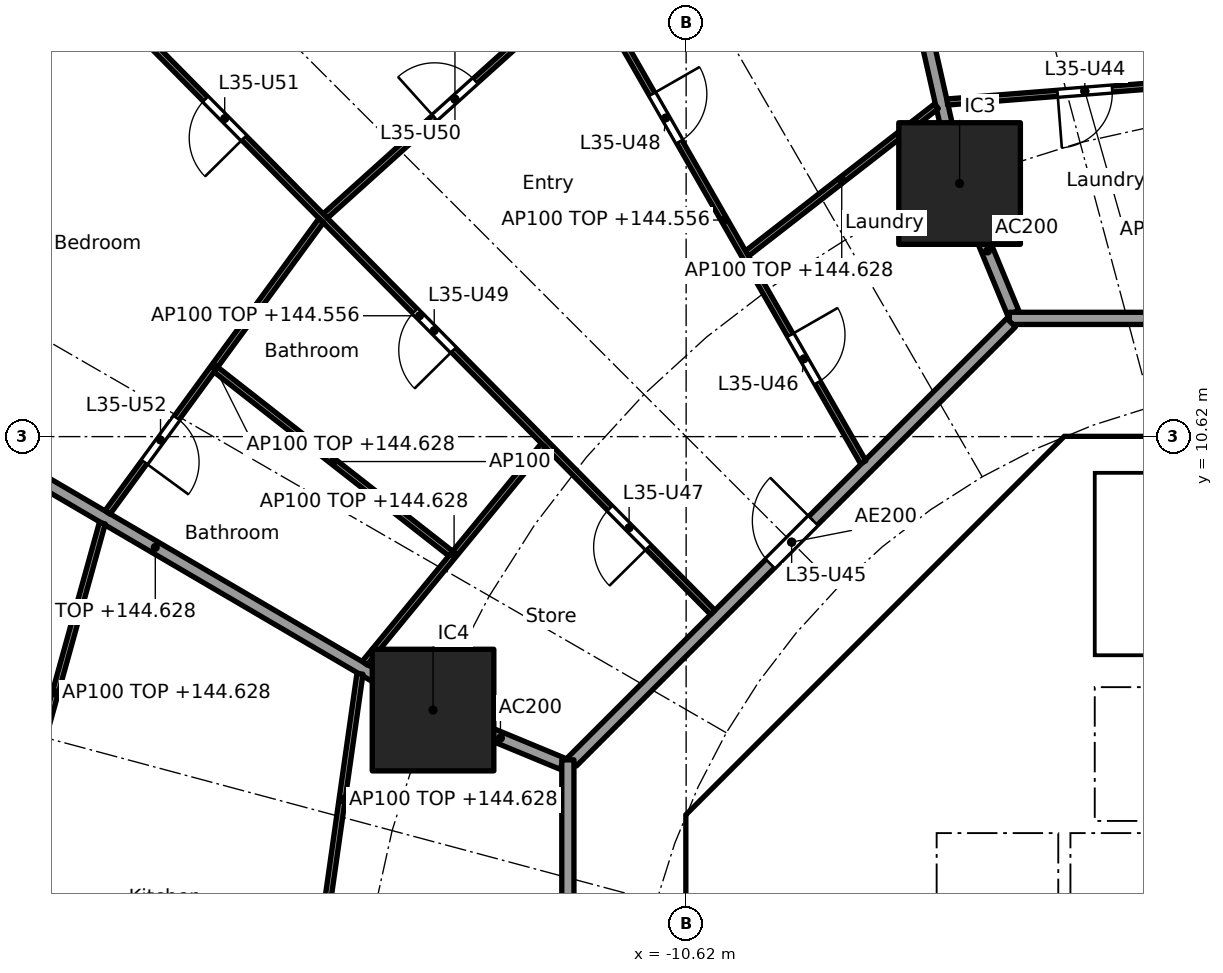
"""IFC4 building model, lengths in metres.
Left out: names, types, materials, properties, quantities, classifications, styles, units other than length and angle.
Written with IfcOpenShell. Run it as: python <this file> out.ifc"""

import sys

from ifc_helpers import new_model, si_unit, direction, frame, frame_2d, origin, origin_2d, place, context, subcontext, project, spatial, polyline, rectangle, outline, extrude, element, fill, save


model = new_model("IFC4")
c1 = context("Model", 3, precision=1e-05, world=origin(), true_north=direction((0.0, 1.0)))
c2 = subcontext(c1, "Body", "Model", "MODEL_VIEW")
j1 = project(units=[si_unit("LENGTHUNIT", "METRE"), si_unit("PLANEANGLEUNIT", "RADIAN")], contexts=[c1])
p1 = place(None, origin())
s1 = spatial("IfcSite", under=j1, at=p1, CompositionType="ELEMENT")
p2 = place(p1, origin())
s2 = spatial("IfcBuilding", under=s1, at=p2, CompositionType="ELEMENT")
p3 = place(p2, frame((0.0, 0.0, 141.8)))
s3 = spatial("IfcBuildingStorey", under=s2, at=p3, CompositionType="ELEMENT", Elevation=141.8)
for number, where, z_axis, x_axis in (
    (1, (-6.123, 14.782, 0.0), (0.0, 0.0, 1.0), (1.0, 0.0, 0.0)),
    (2, (-14.782, 6.123, 0.0), (0.0, 0.0, 1.0), (1.0, 0.0, 0.0)),
):
    element("IfcColumn", number, at=place(p3, frame(where, z_axis=z_axis, x_axis=x_axis)), inside=s3, PredefinedType="COLUMN", context=c2, shape_type="SweptSolid", body=[
        extrude(rectangle(XDim=2.0, YDim=2.0, at=origin_2d()), origin(), (0.0, 0.0, 1.0), 3.7),
    ])
p4 = place(p3, frame((-4.613, 9.988, 0.0), z_axis=(0.0, 0.0, 1.0), x_axis=(-0.707106781187, -0.707106781187, 0.0)))
e3 = element("IfcWall", 3, at=p4, inside=s3, PredefinedType="SHEAR", context=c2, shape_type="SweptSolid", body=[
    extrude(rectangle(XDim=7.602, YDim=0.6, at=frame_2d((3.801, 0.0))), origin(), (0.0, 0.0, 1.0), 3.44),
])
p5 = place(p4, frame((0.351, 0.0, 0.0)))
e4 = element("IfcOpeningElement", 4, at=p5, cuts=e3, PredefinedType="OPENING", context=c2, shape_type="SweptSolid", body=[
    extrude(rectangle(XDim=1.1, YDim=2.1, at=frame_2d((0.55, 1.05))), frame((0.0, 0.31, 0.0), z_axis=(0.0, -1.0, 0.0), x_axis=(1.0, 0.0, 0.0)), (0.0, 0.0, 1.0), 0.62),
])
p6 = place(p3, frame((-10.325, 3.801, 0.0), z_axis=(0.0, 0.0, 1.0), x_axis=(0.0, -1.0, 0.0)))
e5 = element("IfcWall", 5, at=p6, inside=s3, PredefinedType="SHEAR", context=c2, shape_type="SweptSolid", body=[
    extrude(rectangle(XDim=7.602, YDim=0.6, at=frame_2d((3.801, 0.0))), origin(), (0.0, 0.0, 1.0), 3.44),
])
p7 = place(p6, frame((0.651, 0.0, 0.0)))
e6 = element("IfcOpeningElement", 6, at=p7, cuts=e5, PredefinedType="OPENING", context=c2, shape_type="SweptSolid", body=[
    extrude(rectangle(XDim=1.5, YDim=2.1, at=frame_2d((0.75, 1.05))), frame((0.0, 0.31, 0.0), z_axis=(0.0, -1.0, 0.0), x_axis=(1.0, 0.0, 0.0)), (0.0, 0.0, 1.0), 0.62),
])
p8 = place(p6, frame((5.451, 0.0, 0.0)))
e7 = element("IfcOpeningElement", 7, at=p8, cuts=e5, PredefinedType="OPENING", context=c2, shape_type="SweptSolid", body=[
    extrude(rectangle(XDim=1.5, YDim=2.1, at=frame_2d((0.75, 1.05))), frame((0.0, 0.31, 0.0), z_axis=(0.0, -1.0, 0.0), x_axis=(1.0, 0.0, 0.0)), (0.0, 0.0, 1.0), 0.62),
])
p9 = place(p3, frame((-5.8, 4.3, 0.0), z_axis=(0.0, 0.0, 1.0), x_axis=(0.0, 1.0, 0.0)))
e8 = element("IfcWall", 8, at=p9, inside=s3, PredefinedType="PARTITIONING", context=c2, shape_type="SweptSolid", body=[
    extrude(rectangle(XDim=3.927, YDim=0.15, at=frame_2d((1.963, 0.0))), origin(), (0.0, 0.0, 1.0), 3.44),
])
p10 = place(p9, frame((0.413, 0.0, 0.0)))
e9 = element("IfcOpeningElement", 9, at=p10, cuts=e8, PredefinedType="OPENING", context=c2, shape_type="SweptSolid", body=[
    extrude(rectangle(XDim=0.9, YDim=2.1, at=frame_2d((0.45, 1.05))), frame((0.0, 0.085, 0.0), z_axis=(0.0, -1.0, 0.0), x_axis=(1.0, 0.0, 0.0)), (0.0, 0.0, 1.0), 0.17),
])
p11 = place(p9, frame((2.489, 0.0, 0.0)))
e10 = element("IfcOpeningElement", 10, at=p11, cuts=e8, PredefinedType="OPENING", context=c2, shape_type="SweptSolid", body=[
    extrude(rectangle(XDim=0.9, YDim=2.1, at=frame_2d((0.45, 1.05))), frame((0.0, 0.085, 0.0), z_axis=(0.0, -1.0, 0.0), x_axis=(1.0, 0.0, 0.0)), (0.0, 0.0, 1.0), 0.17),
])
p12 = place(p3, frame((-4.0, 4.3, 0.0), z_axis=(0.0, 0.0, 1.0), x_axis=(0.0, 1.0, 0.0)))
e11 = element("IfcWall", 11, at=p12, inside=s3, PredefinedType="SOLIDWALL", context=c2, shape_type="SweptSolid", body=[
    extrude(rectangle(XDim=2.2, YDim=0.2, at=frame_2d((1.1, 0.0))), origin(), (0.0, 0.0, 1.0), 3.44),
])
p13 = place(p12, frame((0.55, 0.0, 0.0)))
e12 = element("IfcOpeningElement", 12, at=p13, cuts=e11, PredefinedType="OPENING", context=c2, shape_type="SweptSolid", body=[
    extrude(rectangle(XDim=1.1, YDim=2.1, at=frame_2d((0.55, 1.05))), frame((0.0, 0.11, 0.0), z_axis=(0.0, -1.0, 0.0), x_axis=(1.0, 0.0, 0.0)), (0.0, 0.0, 1.0), 0.22),
])
p14 = place(p3, origin())
e13 = element("IfcWall", 13, at=p14, inside=s3, PredefinedType="SHEAR", context=c2, shape_type="SweptSolid", body=[
    extrude(outline(polyline([(-10.2, 4.825), (-9.776, 4.401), (-10.025, 4.152), (-10.025, 3.801), (-10.625, 3.801), (-10.625, 4.401), (-10.2, 4.825)])), origin(), (0.0, 0.0, 1.0), 3.44),
])
p15 = place(p3, origin())
e14 = element("IfcWall", 14, at=p15, inside=s3, PredefinedType="SHEAR", context=c2, shape_type="SweptSolid", body=[
    extrude(outline(polyline([(-4.152, 10.025), (-4.401, 9.776), (-4.825, 10.2), (-4.401, 10.625), (4.401, 10.625), (4.825, 10.2), (4.401, 9.776), (4.152, 10.025), (-4.152, 10.025)])), origin(), (0.0, 0.0, 1.0), 3.44),
])
p16 = place(p3, frame((-10.025, 4.0, 0.0), z_axis=(0.0, 0.0, 1.0), x_axis=(1.0, 0.0, 0.0)))
e15 = element("IfcWall", 15, at=p16, inside=s3, PredefinedType="PARTITIONING", context=c2, shape_type="SweptSolid", body=[
    extrude(rectangle(XDim=3.325, YDim=0.2, at=frame_2d((1.662, 0.0))), origin(), (0.0, 0.0, 1.0), 3.44),
])
p17 = place(p3, frame((-8.001, 6.1, 0.0), z_axis=(0.0, 0.0, 1.0), x_axis=(1.0, 0.0, 0.0)))
e16 = element("IfcWall", 16, at=p17, inside=s3, PredefinedType="PARTITIONING", context=c2, shape_type="SweptSolid", body=[
    extrude(rectangle(XDim=2.126, YDim=0.15, at=frame_2d((1.063, 0.0))), origin(), (0.0, 0.0, 1.0), 3.44),
])
p18 = place(p3, origin())
e17 = element("IfcWall", 17, at=p18, inside=s3, PredefinedType="SOLIDWALL", context=c2, shape_type="SweptSolid", body=[
    extrude(outline(polyline([(-6.5, 2.1), (-6.7, 2.1), (-6.7, 4.3), (6.7, 4.3), (6.7, 2.1), (6.5, 2.1), (6.5, 4.1), (4.5, 4.1), (4.5, 2.1), (4.3, 2.1), (4.3, 4.1), (2.3, 4.1), (2.3, 2.1), (2.1, 2.1), (2.1, 4.1), (0.1, 4.1), (0.1, 2.1), (-0.1, 2.1), (-0.1, 4.1), (-2.1, 4.1), (-2.1, 2.1), (-2.3, 2.1), (-2.3, 4.1), (-4.3, 4.1), (-4.3, 2.1), (-4.5, 2.1), (-4.5, 4.1), (-6.5, 4.1), (-6.5, 2.1)])), origin(), (0.0, 0.0, 1.0), 3.44),
])
p19 = place(p3, origin())
e18 = element("IfcWall", 18, at=p19, inside=s3, PredefinedType="SOLIDWALL", context=c2, shape_type="SweptSolid", body=[
    extrude(outline(polyline([(-3.9, 7.025), (-4.1, 7.025), (-4.1, 10.025), (-3.9, 10.025), (-3.9, 7.025)])), origin(), (0.0, 0.0, 1.0), 3.44),
])
p20 = place(p3, origin())
e19 = element("IfcWall", 19, at=p20, inside=s3, PredefinedType="SOLIDWALL", context=c2, shape_type="SweptSolid", body=[
    extrude(outline(polyline([(4.1, 6.5), (-4.1, 6.5), (-4.1, 7.025), (4.1, 7.025), (4.1, 6.5)])), origin(), (0.0, 0.0, 1.0), 3.44),
])
p21 = place(p3, frame((-5.243, 12.657, 0.0), z_axis=(0.0, 0.0, 1.0), x_axis=(-0.38273085373, 0.923859888513, 0.0)))
e20 = element("IfcWall", 20, at=p21, inside=s3, PredefinedType="PARTITIONING", context=c2, shape_type="SweptSolid", body=[
    extrude(rectangle(XDim=2.199, YDim=0.2, at=frame_2d((1.1, 0.0))), origin(), (0.0, 0.0, 1.0), 3.44),
])
p22 = place(p3, frame((-6.134, 14.831, 0.0), z_axis=(0.0, 0.0, 1.0), x_axis=(-0.220337590808, 0.975423675167, 0.0)))
e21 = element("IfcWall", 21, at=p22, inside=s3, PredefinedType="PARTITIONING", context=c2, shape_type="SweptSolid", body=[
    extrude(rectangle(XDim=10.451, YDim=0.2, at=frame_2d((5.226, 0.0))), origin(), (0.0, 0.0, 1.0), 2.828),
])
p23 = place(p3, frame((-12.657, 5.243, 0.0), z_axis=(0.0, 0.0, 1.0), x_axis=(-0.923869415315, 0.382707856524, 0.0)))
e22 = element("IfcWall", 22, at=p23, inside=s3, PredefinedType="PARTITIONING", context=c2, shape_type="SweptSolid", body=[
    extrude(rectangle(XDim=2.2, YDim=0.2, at=frame_2d((1.1, 0.0))), origin(), (0.0, 0.0, 1.0), 3.44),
])
p24 = place(p3, frame((-14.825, 6.148, 0.0), z_axis=(0.0, 0.0, 1.0), x_axis=(-0.862852031662, 0.505456597006, 0.0)))
e23 = element("IfcWall", 23, at=p24, inside=s3, PredefinedType="PARTITIONING", context=c2, shape_type="SweptSolid", body=[
    extrude(rectangle(XDim=10.487, YDim=0.2, at=frame_2d((5.244, 0.0))), origin(), (0.0, 0.0, 1.0), 2.828),
])
p25 = place(p3, frame((5.104, 12.565, 0.0), z_axis=(0.0, 0.0, 1.0), x_axis=(-1.0, 0.0, 0.0)))
e24 = element("IfcWall", 24, at=p25, inside=s3, PredefinedType="PARTITIONING", context=c2, shape_type="SweptSolid", body=[
    extrude(rectangle(XDim=10.409, YDim=0.2, at=frame_2d((5.205, 0.0))), origin(), (0.0, 0.0, 1.0), 3.44),
])
p26 = place(p3, frame((-5.275, 12.494, 0.0), z_axis=(0.0, 0.0, 1.0), x_axis=(-0.707106781187, -0.707106781187, 0.0)))
e25 = element("IfcWall", 25, at=p26, inside=s3, PredefinedType="PARTITIONING", context=c2, shape_type="SweptSolid", body=[
    extrude(rectangle(XDim=10.209, YDim=0.2, at=frame_2d((5.104, 0.0))), origin(), (0.0, 0.0, 1.0), 3.44),
])
p27 = place(p26, frame((4.604, 0.0, 0.0)))
e26 = element("IfcOpeningElement", 26, at=p27, cuts=e25, PredefinedType="OPENING", context=c2, shape_type="SweptSolid", body=[
    extrude(rectangle(XDim=1.0, YDim=2.1, at=frame_2d((0.5, 1.05))), frame((0.0, 0.11, 0.0), z_axis=(0.0, -1.0, 0.0), x_axis=(1.0, 0.0, 0.0)), (0.0, 0.0, 1.0), 0.22),
])
p28 = place(p3, frame((-12.565, 5.304, 0.0), z_axis=(0.0, 0.0, 1.0), x_axis=(0.0, -1.0, 0.0)))
e27 = element("IfcWall", 27, at=p28, inside=s3, PredefinedType="PARTITIONING", context=c2, shape_type="SweptSolid", body=[
    extrude(rectangle(XDim=10.409, YDim=0.2, at=frame_2d((5.205, 0.0))), origin(), (0.0, 0.0, 1.0), 3.44),
])
p29 = place(p3, frame((-1.802, 16.479, 0.0), z_axis=(0.0, 0.0, 1.0), x_axis=(-0.996907698294, -0.078581429625, 0.0)))
e28 = element("IfcWall", 28, at=p29, inside=s3, PredefinedType="PARTITIONING", context=c2, shape_type="SweptSolid", body=[
    extrude(rectangle(XDim=4.536, YDim=0.1, at=frame_2d((2.268, 0.0))), origin(), (0.0, 0.0, 1.0), 2.828),
])
p30 = place(p29, frame((1.818, 0.0, 0.0)))
e29 = element("IfcOpeningElement", 29, at=p30, cuts=e28, PredefinedType="OPENING", context=c2, shape_type="SweptSolid", body=[
    extrude(rectangle(XDim=0.9, YDim=2.1, at=frame_2d((0.45, 1.05))), frame((0.0, 0.06, 0.0), z_axis=(0.0, -1.0, 0.0), x_axis=(1.0, 0.0, 0.0)), (0.0, 0.0, 1.0), 0.12),
])
p31 = place(p3, frame((-6.503, 16.054, 0.0), z_axis=(0.0, 0.0, 1.0), x_axis=(-0.789428807693, -0.613842127574, 0.0)))
e30 = element("IfcWall", 30, at=p31, inside=s3, PredefinedType="PARTITIONING", context=c2, shape_type="SweptSolid", body=[
    extrude(rectangle(XDim=3.948, YDim=0.1, at=frame_2d((1.974, 0.0))), origin(), (0.0, 0.0, 1.0), 2.828),
])
p32 = place(p3, frame((-7.708, 10.198, 0.0), z_axis=(0.0, 0.0, 1.0), x_axis=(-0.497449462689, 0.867492957937, 0.0)))
e31 = element("IfcWall", 31, at=p32, inside=s3, PredefinedType="PARTITIONING", context=c2, shape_type="SweptSolid", body=[
    extrude(rectangle(XDim=9.185, YDim=0.1, at=frame_2d((4.592, 0.0))), origin(), (0.0, 0.0, 1.0), 2.756),
])
p33 = place(p32, frame((1.511, 0.0, 0.0)))
e32 = element("IfcOpeningElement", 32, at=p33, cuts=e31, PredefinedType="OPENING", context=c2, shape_type="SweptSolid", body=[
    extrude(rectangle(XDim=0.9, YDim=2.1, at=frame_2d((0.45, 1.05))), frame((0.0, 0.06, 0.0), z_axis=(0.0, -1.0, 0.0), x_axis=(1.0, 0.0, 0.0)), (0.0, 0.0, 1.0), 0.12),
])
p34 = place(p32, frame((6.078, 0.0, 0.0)))
e33 = element("IfcOpeningElement", 33, at=p34, cuts=e31, PredefinedType="OPENING", context=c2, shape_type="SweptSolid", body=[
    extrude(rectangle(XDim=0.9, YDim=2.1, at=frame_2d((0.45, 1.05))), frame((0.0, 0.06, 0.0), z_axis=(0.0, -1.0, 0.0), x_axis=(1.0, 0.0, 0.0)), (0.0, 0.0, 1.0), 0.12),
])
p35 = place(p3, frame((-12.289, 18.089, 0.0), z_axis=(0.0, 0.0, 1.0), x_axis=(-0.743146066164, -0.669129228435, 0.0)))
e34 = element("IfcWall", 34, at=p35, inside=s3, PredefinedType="PARTITIONING", context=c2, shape_type="SweptSolid", body=[
    extrude(rectangle(XDim=5.739, YDim=0.1, at=frame_2d((2.87, 0.0))), origin(), (0.0, 0.0, 1.0), 2.828),
])
p36 = place(p35, frame((2.42, 0.0, 0.0)))
e35 = element("IfcOpeningElement", 35, at=p36, cuts=e34, PredefinedType="OPENING", context=c2, shape_type="SweptSolid", body=[
    extrude(rectangle(XDim=0.9, YDim=2.1, at=frame_2d((0.45, 1.05))), frame((0.0, 0.06, 0.0), z_axis=(0.0, -1.0, 0.0), x_axis=(1.0, 0.0, 0.0)), (0.0, 0.0, 1.0), 0.12),
])
p37 = place(p3, frame((-10.182, 7.729, 0.0), z_axis=(0.0, 0.0, 1.0), x_axis=(-0.702930219229, 0.7112588185, 0.0)))
e36 = element("IfcWall", 36, at=p37, inside=s3, PredefinedType="PARTITIONING", context=c2, shape_type="SweptSolid", body=[
    extrude(rectangle(XDim=13.719, YDim=0.1, at=frame_2d((6.859, 0.0))), origin(), (0.0, 0.0, 1.0), 2.756),
])
p38 = place(p37, frame((1.507, 0.0, 0.0)))
e37 = element("IfcOpeningElement", 37, at=p38, cuts=e36, PredefinedType="OPENING", context=c2, shape_type="SweptSolid", body=[
    extrude(rectangle(XDim=0.9, YDim=2.1, at=frame_2d((0.45, 1.05))), frame((0.0, 0.06, 0.0), z_axis=(0.0, -1.0, 0.0), x_axis=(1.0, 0.0, 0.0)), (0.0, 0.0, 1.0), 0.12),
])
p39 = place(p37, frame((6.067, 0.0, 0.0)))
e38 = element("IfcOpeningElement", 38, at=p39, cuts=e36, PredefinedType="OPENING", context=c2, shape_type="SweptSolid", body=[
    extrude(rectangle(XDim=0.9, YDim=2.1, at=frame_2d((0.45, 1.05))), frame((0.0, 0.06, 0.0), z_axis=(0.0, -1.0, 0.0), x_axis=(1.0, 0.0, 0.0)), (0.0, 0.0, 1.0), 0.12),
])
p40 = place(p37, frame((10.969, 0.0, 0.0)))
e39 = element("IfcOpeningElement", 39, at=p40, cuts=e36, PredefinedType="OPENING", context=c2, shape_type="SweptSolid", body=[
    extrude(rectangle(XDim=0.9, YDim=2.1, at=frame_2d((0.45, 1.05))), frame((0.0, 0.06, 0.0), z_axis=(0.0, -1.0, 0.0), x_axis=(1.0, 0.0, 0.0)), (0.0, 0.0, 1.0), 0.12),
])
p41 = place(p3, frame((-12.965, 10.475, 0.0), z_axis=(0.0, 0.0, 1.0), x_axis=(-0.634943961338, -0.772558195841, 0.0)))
e40 = element("IfcWall", 40, at=p41, inside=s3, PredefinedType="PARTITIONING", context=c2, shape_type="SweptSolid", body=[
    extrude(rectangle(XDim=4.632, YDim=0.1, at=frame_2d((2.316, 0.0))), origin(), (0.0, 0.0, 1.0), 2.828),
])
p42 = place(p3, frame((-16.621, 14.174, 0.0), z_axis=(0.0, 0.0, 1.0), x_axis=(-0.590674917338, -0.806909624449, 0.0)))
e41 = element("IfcWall", 41, at=p42, inside=s3, PredefinedType="PARTITIONING", context=c2, shape_type="SweptSolid", body=[
    extrude(rectangle(XDim=5.949, YDim=0.1, at=frame_2d((2.975, 0.0))), origin(), (0.0, 0.0, 1.0), 2.828),
])
p43 = place(p42, frame((4.024, 0.0, 0.0)))
e42 = element("IfcOpeningElement", 42, at=p43, cuts=e41, PredefinedType="OPENING", context=c2, shape_type="SweptSolid", body=[
    extrude(rectangle(XDim=0.9, YDim=2.1, at=frame_2d((0.45, 1.05))), frame((0.0, 0.06, 0.0), z_axis=(0.0, -1.0, 0.0), x_axis=(1.0, 0.0, 0.0)), (0.0, 0.0, 1.0), 0.12),
])
p44 = place(p3, frame((-14.491, 8.697, 0.0), z_axis=(0.0, 0.0, 1.0), x_axis=(-0.787139479951, 0.616775031193, 0.0)))
e43 = element("IfcWall", 43, at=p44, inside=s3, PredefinedType="PARTITIONING", context=c2, shape_type="SweptSolid", body=[
    extrude(rectangle(XDim=4.907, YDim=0.1, at=frame_2d((2.453, 0.0))), origin(), (0.0, 0.0, 1.0), 3.44),
])
p45 = place(p3, frame((-15.984, 6.72, 0.0), z_axis=(0.0, 0.0, 1.0), x_axis=(-0.140684869512, -0.990054426529, 0.0)))
e44 = element("IfcWall", 44, at=p45, inside=s3, PredefinedType="PARTITIONING", context=c2, shape_type="SweptSolid", body=[
    extrude(rectangle(XDim=4.177, YDim=0.1, at=frame_2d((2.088, 0.0))), origin(), (0.0, 0.0, 1.0), 2.828),
])
p46 = place(p3, frame((-20.221, 9.197, 0.0), z_axis=(0.0, 0.0, 1.0), x_axis=(-0.267398009191, -0.963586168789, 0.0)))
e45 = element("IfcWall", 45, at=p46, inside=s3, PredefinedType="PARTITIONING", context=c2, shape_type="SweptSolid", body=[
    extrude(rectangle(XDim=5.788, YDim=0.1, at=frame_2d((2.894, 0.0))), origin(), (0.0, 0.0, 1.0), 2.828),
])
p47 = place(p13, origin())
e46 = element("IfcDoor", 46, at=p47, inside=s3, OperationType="DOUBLE_DOOR_SLIDING", PredefinedType="DOOR", context=c2, shape_type="SweptSolid", body=[
    extrude(rectangle(XDim=1.1, YDim=2.1, at=frame_2d((0.55, 1.05))), frame((0.0, 0.025, 0.0), z_axis=(0.0, -1.0, 0.0), x_axis=(1.0, 0.0, 0.0)), (0.0, 0.0, 1.0), 0.05),
])
fill(e12, e46)
p48 = place(p10, origin())
e47 = element("IfcDoor", 47, at=p48, inside=s3, OperationType="SINGLE_SWING_RIGHT", PredefinedType="DOOR", context=c2, shape_type="SweptSolid", body=[
    extrude(rectangle(XDim=0.9, YDim=2.1, at=frame_2d((0.45, 1.05))), frame((0.0, 0.025, 0.0), z_axis=(0.0, -1.0, 0.0), x_axis=(1.0, 0.0, 0.0)), (0.0, 0.0, 1.0), 0.05),
])
fill(e9, e47)
p49 = place(p11, origin())
e48 = element("IfcDoor", 48, at=p49, inside=s3, OperationType="SINGLE_SWING_RIGHT", PredefinedType="DOOR", context=c2, shape_type="SweptSolid", body=[
    extrude(rectangle(XDim=0.9, YDim=2.1, at=frame_2d((0.45, 1.05))), frame((0.0, 0.025, 0.0), z_axis=(0.0, -1.0, 0.0), x_axis=(1.0, 0.0, 0.0)), (0.0, 0.0, 1.0), 0.05),
])
fill(e10, e48)
p50 = place(p7, origin())
e49 = element("IfcDoor", 49, at=p50, inside=s3, OperationType="DOUBLE_DOOR_SINGLE_SWING", PredefinedType="DOOR", context=c2, shape_type="SweptSolid", body=[
    extrude(rectangle(XDim=1.5, YDim=2.1, at=frame_2d((0.75, 1.05))), frame((0.0, 0.025, 0.0), z_axis=(0.0, -1.0, 0.0), x_axis=(1.0, 0.0, 0.0)), (0.0, 0.0, 1.0), 0.05),
])
fill(e6, e49)
p51 = place(p5, origin())
e50 = element("IfcDoor", 50, at=p51, inside=s3, OperationType="SINGLE_SWING_RIGHT", PredefinedType="DOOR", context=c2, shape_type="SweptSolid", body=[
    extrude(rectangle(XDim=1.1, YDim=2.1, at=frame_2d((0.55, 1.05))), frame((0.0, 0.025, 0.0), z_axis=(0.0, -1.0, 0.0), x_axis=(1.0, 0.0, 0.0)), (0.0, 0.0, 1.0), 0.05),
])
fill(e4, e50)
p52 = place(p30, origin())
e51 = element("IfcDoor", 51, at=p52, inside=s3, OperationType="SINGLE_SWING_RIGHT", PredefinedType="DOOR", context=c2, shape_type="SweptSolid", body=[
    extrude(rectangle(XDim=0.9, YDim=2.1, at=frame_2d((0.45, 1.05))), frame((0.0, 0.025, 0.0), z_axis=(0.0, -1.0, 0.0), x_axis=(1.0, 0.0, 0.0)), (0.0, 0.0, 1.0), 0.05),
])
fill(e29, e51)
p53 = place(p27, frame((1.0, 0.0, 0.0), x_axis=(-1.0, 0.0, 0.0)))
e52 = element("IfcDoor", 52, at=p53, inside=s3, OperationType="SINGLE_SWING_RIGHT", PredefinedType="DOOR", context=c2, shape_type="SweptSolid", body=[
    extrude(rectangle(XDim=1.0, YDim=2.1, at=frame_2d((0.5, 1.05))), frame((0.0, 0.025, 0.0), z_axis=(0.0, -1.0, 0.0), x_axis=(1.0, 0.0, 0.0)), (0.0, 0.0, 1.0), 0.05),
])
fill(e26, e52)
p54 = place(p33, frame((0.9, 0.0, 0.0), x_axis=(-1.0, 0.0, 0.0)))
e53 = element("IfcDoor", 53, at=p54, inside=s3, OperationType="SINGLE_SWING_LEFT", PredefinedType="DOOR", context=c2, shape_type="SweptSolid", body=[
    extrude(rectangle(XDim=0.9, YDim=2.1, at=frame_2d((0.45, 1.05))), frame((0.0, 0.025, 0.0), z_axis=(0.0, -1.0, 0.0), x_axis=(1.0, 0.0, 0.0)), (0.0, 0.0, 1.0), 0.05),
])
fill(e32, e53)
p55 = place(p38, origin())
e54 = element("IfcDoor", 54, at=p55, inside=s3, OperationType="SINGLE_SWING_LEFT", PredefinedType="DOOR", context=c2, shape_type="SweptSolid", body=[
    extrude(rectangle(XDim=0.9, YDim=2.1, at=frame_2d((0.45, 1.05))), frame((0.0, 0.025, 0.0), z_axis=(0.0, -1.0, 0.0), x_axis=(1.0, 0.0, 0.0)), (0.0, 0.0, 1.0), 0.05),
])
fill(e37, e54)
p56 = place(p34, frame((0.9, 0.0, 0.0), x_axis=(-1.0, 0.0, 0.0)))
e55 = element("IfcDoor", 55, at=p56, inside=s3, OperationType="SINGLE_SWING_LEFT", PredefinedType="DOOR", context=c2, shape_type="SweptSolid", body=[
    extrude(rectangle(XDim=0.9, YDim=2.1, at=frame_2d((0.45, 1.05))), frame((0.0, 0.025, 0.0), z_axis=(0.0, -1.0, 0.0), x_axis=(1.0, 0.0, 0.0)), (0.0, 0.0, 1.0), 0.05),
])
fill(e33, e55)
p57 = place(p39, origin())
e56 = element("IfcDoor", 56, at=p57, inside=s3, OperationType="SINGLE_SWING_LEFT", PredefinedType="DOOR", context=c2, shape_type="SweptSolid", body=[
    extrude(rectangle(XDim=0.9, YDim=2.1, at=frame_2d((0.45, 1.05))), frame((0.0, 0.025, 0.0), z_axis=(0.0, -1.0, 0.0), x_axis=(1.0, 0.0, 0.0)), (0.0, 0.0, 1.0), 0.05),
])
fill(e38, e56)
p58 = place(p36, frame((0.9, 0.0, 0.0), x_axis=(-1.0, 0.0, 0.0)))
e57 = element("IfcDoor", 57, at=p58, inside=s3, OperationType="SINGLE_SWING_LEFT", PredefinedType="DOOR", context=c2, shape_type="SweptSolid", body=[
    extrude(rectangle(XDim=0.9, YDim=2.1, at=frame_2d((0.45, 1.05))), frame((0.0, 0.025, 0.0), z_axis=(0.0, -1.0, 0.0), x_axis=(1.0, 0.0, 0.0)), (0.0, 0.0, 1.0), 0.05),
])
fill(e35, e57)
p59 = place(p40, origin())
e58 = element("IfcDoor", 58, at=p59, inside=s3, OperationType="SINGLE_SWING_LEFT", PredefinedType="DOOR", context=c2, shape_type="SweptSolid", body=[
    extrude(rectangle(XDim=0.9, YDim=2.1, at=frame_2d((0.45, 1.05))), frame((0.0, 0.025, 0.0), z_axis=(0.0, -1.0, 0.0), x_axis=(1.0, 0.0, 0.0)), (0.0, 0.0, 1.0), 0.05),
])
fill(e39, e58)
p60 = place(p43, origin())
e59 = element("IfcDoor", 59, at=p60, inside=s3, OperationType="SINGLE_SWING_RIGHT", PredefinedType="DOOR", context=c2, shape_type="SweptSolid", body=[
    extrude(rectangle(XDim=0.9, YDim=2.1, at=frame_2d((0.45, 1.05))), frame((0.0, 0.025, 0.0), z_axis=(0.0, -1.0, 0.0), x_axis=(1.0, 0.0, 0.0)), (0.0, 0.0, 1.0), 0.05),
])
fill(e42, e59)
save(model, sys.argv[1])
